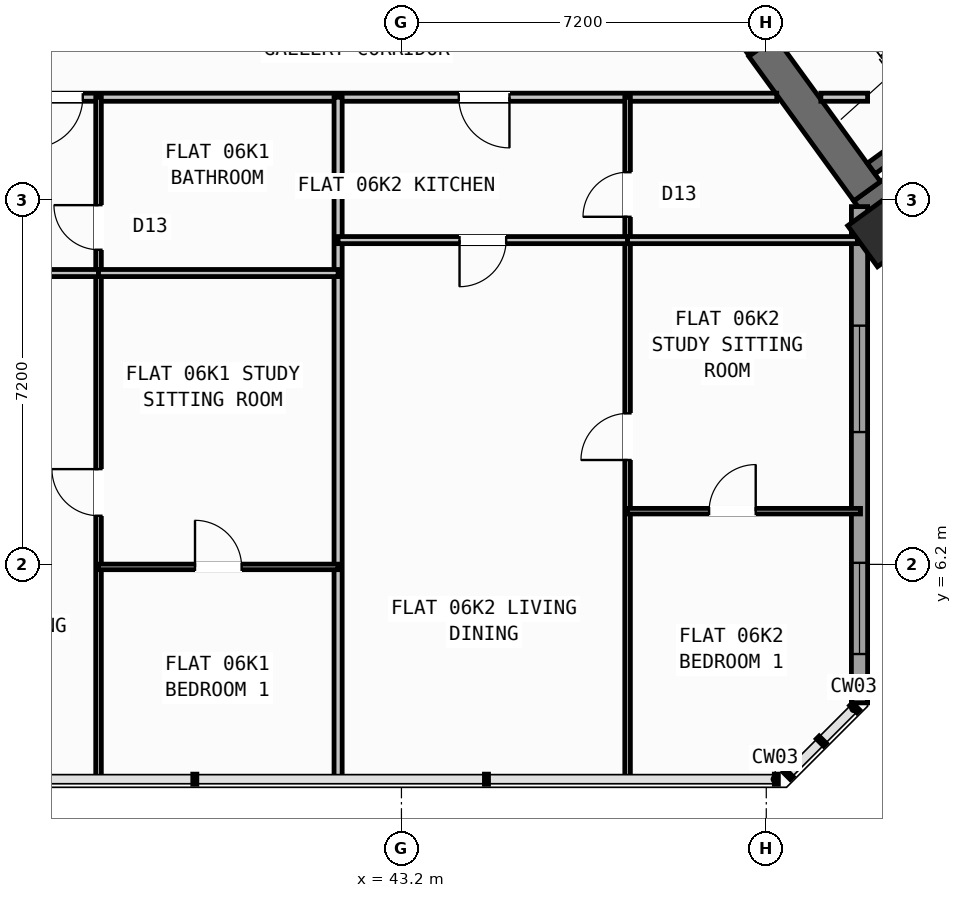
"""IFC4 building model, lengths in metres.
Left out: names, types, materials, properties, quantities, classifications, styles, units other than length and angle.
Written with IfcOpenShell. Run it as: python <this file> out.ifc"""

import sys

from ifc_helpers import new_model, si_unit, direction, frame, frame_2d, origin, origin_2d, place, context, subcontext, project, spatial, rectangle, hollow_rectangle, extrude, source, transform, mapped, element, fill, save


model = new_model("IFC4")
c1 = context("Model", 3, precision=1e-05, world=origin(), true_north=direction((0.0, 1.0)))
c2 = subcontext(c1, "Body", "Model", "MODEL_VIEW")
j1 = project(units=[si_unit("LENGTHUNIT", "METRE"), si_unit("PLANEANGLEUNIT", "RADIAN")], contexts=[c1])
p1 = place(None, origin())
s1 = spatial("IfcSite", under=j1, at=p1, CompositionType="ELEMENT")
p2 = place(p1, origin())
s2 = spatial("IfcBuilding", under=s1, at=p2, CompositionType="ELEMENT")
p3 = place(p2, frame((0.0, 0.0, 27.6)))
s3 = spatial("IfcBuildingStorey", under=s2, at=p3, CompositionType="ELEMENT", Elevation=27.6)
p4 = place(p3, frame((36.683, 18.304, 0.0), z_axis=(0.0, 0.0, 1.0), x_axis=(-0.529899109053, -0.848060690178, 0.0)))
e1 = element("IfcWall", 1, at=p4, inside=s3, PredefinedType="SHEAR", context=c2, shape_type="SweptSolid", body=[
    extrude(rectangle(XDim=6.375, YDim=0.65, at=frame_2d((3.188, 0.0))), origin(), (0.0, 0.0, 1.0), 3.35),
])
p5 = place(p3, frame((52.318, 13.11, 0.0), z_axis=(0.0, 0.0, 1.0), x_axis=(0.809019445368, 0.587781878776, 0.0)))
e2 = element("IfcWall", 2, at=p5, inside=s3, PredefinedType="SHEAR", context=c2, shape_type="SweptSolid", body=[
    extrude(rectangle(XDim=12.44, YDim=0.65, at=frame_2d((6.22, 0.0))), origin(), (0.0, 0.0, 1.0), 3.35),
])
p6 = place(p3, frame((52.39, 13.564, 0.0), z_axis=(0.0, 0.0, 1.0), x_axis=(-0.58779688989, 0.809008539037, 0.0)))
e3 = element("IfcWall", 3, at=p6, inside=s3, PredefinedType="SHEAR", context=c2, shape_type="SweptSolid", body=[
    extrude(rectangle(XDim=3.525, YDim=0.65, at=frame_2d((1.763, 0.0))), origin(), (0.0, 0.0, 1.0), 3.35),
])
m1 = source(origin(), c2, "Body", "SweptSolid", [
    extrude(hollow_rectangle(XDim=1.0, YDim=1.0, WallThickness=0.04, at=origin_2d()), origin(), (0.0, 0.0, 1.0), 3.6),
])
p7 = place(p3, frame((52.705, 12.773, 0.0), z_axis=(0.0, 0.0, 1.0), x_axis=(0.809016994375, 0.587785252292, 0.0)))
e4 = element("IfcColumn", 4, at=p7, inside=s3, PredefinedType="COLUMN", context=c2, shape_type="MappedRepresentation", body=[
    mapped(m1, transform((0.0, 0.0, 0.0), scale=1.0)),
])
p8 = place(p3, frame((56.581, 7.439, 0.0), z_axis=(0.0, 0.0, 1.0), x_axis=(-0.587785875463, 0.809016541614, 0.0)))
e5 = element("IfcWall", 5, at=p8, inside=s3, PredefinedType="STANDARD", context=c2, shape_type="SweptSolid", body=[
    extrude(rectangle(XDim=6.774, YDim=0.32, at=frame_2d((3.387, 0.0))), origin(), (0.0, 0.0, 1.0), 2.725),
])
p9 = place(p8, frame((1.556, 0.0, 0.8)))
e6 = element("IfcOpeningElement", 6, at=p9, cuts=e5, PredefinedType="OPENING", context=c2, shape_type="SweptSolid", body=[
    extrude(rectangle(XDim=2.1, YDim=1.55, at=frame_2d((1.05, 0.775))), frame((0.0, 0.17, 0.0), z_axis=(0.0, -1.0, 0.0), x_axis=(1.0, 0.0, 0.0)), (0.0, 0.0, 1.0), 0.34),
])
p10 = place(p3, frame((52.24, 13.261, 0.0), z_axis=(0.0, 0.0, 1.0), x_axis=(0.0, -1.0, 0.0)))
e7 = element("IfcWall", 7, at=p10, inside=s3, PredefinedType="STANDARD", context=c2, shape_type="SweptSolid", body=[
    extrude(rectangle(XDim=9.795, YDim=0.32, at=frame_2d((4.897, 0.0))), origin(), (0.0, 0.0, 1.0), 3.35),
])
p11 = place(p10, frame((2.349, 0.0, 0.8)))
e8 = element("IfcOpeningElement", 8, at=p11, cuts=e7, PredefinedType="OPENING", context=c2, shape_type="SweptSolid", body=[
    extrude(rectangle(XDim=2.1, YDim=1.55, at=frame_2d((1.05, 0.775))), frame((0.0, 0.17, 0.0), z_axis=(0.0, -1.0, 0.0), x_axis=(1.0, 0.0, 0.0)), (0.0, 0.0, 1.0), 0.34),
])
p12 = place(p10, frame((7.03, 0.0, 0.85)))
e9 = element("IfcOpeningElement", 9, at=p12, cuts=e7, PredefinedType="OPENING", context=c2, shape_type="SweptSolid", body=[
    extrude(rectangle(XDim=1.8, YDim=1.5, at=frame_2d((0.9, 0.75))), frame((0.0, 0.17, 0.0), z_axis=(0.0, -1.0, 0.0), x_axis=(1.0, 0.0, 0.0)), (0.0, 0.0, 1.0), 0.34),
])
p13 = place(p3, frame((52.472, 14.013, 0.0), z_axis=(0.0, 0.0, 1.0), x_axis=(0.809028366311, 0.587769599847, 0.0)))
e10 = element("IfcWall", 10, at=p13, inside=s3, PredefinedType="SHEAR", context=c2, shape_type="SweptSolid", body=[
    extrude(rectangle(XDim=7.33, YDim=0.26, at=frame_2d((3.665, 0.0))), origin(), (0.0, 0.0, 1.0), 3.35),
])
p14 = place(p3, frame((35.296, 15.42, 0.0), z_axis=(0.0, 0.0, 1.0), x_axis=(1.0, 0.0, 0.0)))
e11 = element("IfcWall", 11, at=p14, inside=s3, PredefinedType="PARTITIONING", context=c2, shape_type="SweptSolid", body=[
    extrude(rectangle(XDim=15.311, YDim=0.16, at=frame_2d((7.655, 0.0))), origin(), (0.0, 0.0, 1.0), 3.34),
])
p15 = place(p14, frame((0.615, 0.0, 0.0)))
e12 = element("IfcOpeningElement", 12, at=p15, cuts=e11, PredefinedType="OPENING", context=c2, shape_type="SweptSolid", body=[
    extrude(rectangle(XDim=1.0, YDim=2.1, at=frame_2d((0.5, 1.05))), frame((0.0, 0.09, 0.0), z_axis=(0.0, -1.0, 0.0), x_axis=(1.0, 0.0, 0.0)), (0.0, 0.0, 1.0), 0.18),
])
p16 = place(p14, frame((9.035, 0.0, 0.0)))
e13 = element("IfcOpeningElement", 13, at=p16, cuts=e11, PredefinedType="OPENING", context=c2, shape_type="SweptSolid", body=[
    extrude(rectangle(XDim=1.0, YDim=2.1, at=frame_2d((0.5, 1.05))), frame((0.0, 0.09, 0.0), z_axis=(0.0, -1.0, 0.0), x_axis=(1.0, 0.0, 0.0)), (0.0, 0.0, 1.0), 0.18),
])
p17 = place(p3, frame((51.477, 15.42, 0.0), z_axis=(0.0, 0.0, 1.0), x_axis=(1.0, 0.0, 0.0)))
e14 = element("IfcWall", 14, at=p17, inside=s3, PredefinedType="PARTITIONING", context=c2, shape_type="SweptSolid", body=[
    extrude(rectangle(XDim=0.923, YDim=0.16, at=frame_2d((0.461, 0.0))), origin(), (0.0, 0.0, 1.0), 3.34),
])
p18 = place(p3, frame((50.119, 16.333, 0.0), z_axis=(0.0, 0.0, 1.0), x_axis=(-0.587749856981, 0.809042709391, 0.0)))
e15 = element("IfcWall", 15, at=p18, inside=s3, PredefinedType="STANDARD", context=c2, shape_type="SweptSolid", body=[
    extrude(rectangle(XDim=2.96, YDim=0.2, at=frame_2d((1.48, 0.0))), origin(), (0.0, 0.0, 1.0), 3.34),
])
p19 = place(p18, frame((0.53, 0.0, 0.0)))
e16 = element("IfcOpeningElement", 16, at=p19, cuts=e15, PredefinedType="OPENING", context=c2, shape_type="SweptSolid", body=[
    extrude(rectangle(XDim=1.5, YDim=2.15, at=frame_2d((0.75, 1.075))), frame((0.0, 0.11, 0.0), z_axis=(0.0, -1.0, 0.0), x_axis=(1.0, 0.0, 0.0)), (0.0, 0.0, 1.0), 0.22),
])
p20 = place(p3, frame((41.95, 1.96, 0.0), z_axis=(0.0, 0.0, 1.0), x_axis=(0.0, 1.0, 0.0)))
e17 = element("IfcWall", 17, at=p20, inside=s3, PredefinedType="PARTITIONING", context=c2, shape_type="SweptSolid", body=[
    extrude(rectangle(XDim=13.46, YDim=0.16, at=frame_2d((6.73, 0.0))), origin(), (0.0, 0.0, 1.0), 3.34),
])
p21 = place(p3, frame((37.222, 1.96, 0.0), z_axis=(0.0, 0.0, 1.0), x_axis=(0.0, 1.0, 0.0)))
e18 = element("IfcWall", 18, at=p21, inside=s3, PredefinedType="PARTITIONING", context=c2, shape_type="SweptSolid", body=[
    extrude(rectangle(XDim=13.46, YDim=0.11, at=frame_2d((6.73, 0.0))), origin(), (0.0, 0.0, 1.0), 3.34),
])
p22 = place(p21, frame((5.2, 0.0, 0.0)))
e19 = element("IfcOpeningElement", 19, at=p22, cuts=e18, PredefinedType="OPENING", context=c2, shape_type="SweptSolid", body=[
    extrude(rectangle(XDim=0.92, YDim=2.08, at=frame_2d((0.46, 1.04))), frame((0.0, 0.065, 0.0), z_axis=(0.0, -1.0, 0.0), x_axis=(1.0, 0.0, 0.0)), (0.0, 0.0, 1.0), 0.13),
])
p23 = place(p21, frame((10.45, 0.0, 0.0)))
e20 = element("IfcOpeningElement", 20, at=p23, cuts=e18, PredefinedType="OPENING", context=c2, shape_type="SweptSolid", body=[
    extrude(rectangle(XDim=0.88, YDim=2.08, at=frame_2d((0.44, 1.04))), frame((0.0, 0.065, 0.0), z_axis=(0.0, -1.0, 0.0), x_axis=(1.0, 0.0, 0.0)), (0.0, 0.0, 1.0), 0.13),
])
p24 = place(p3, frame((33.564, 11.95, 0.0), z_axis=(0.0, 0.0, 1.0), x_axis=(1.0, 0.0, 0.0)))
e21 = element("IfcWall", 21, at=p24, inside=s3, PredefinedType="PLUMBINGWALL", context=c2, shape_type="SweptSolid", body=[
    extrude(rectangle(XDim=3.657, YDim=0.14, at=frame_2d((1.829, 0.0))), origin(), (0.0, 0.0, 1.0), 2.525),
])
p25 = place(p24, frame((0.637, 0.0, 0.0)))
e22 = element("IfcOpeningElement", 22, at=p25, cuts=e21, PredefinedType="OPENING", context=c2, shape_type="SweptSolid", body=[
    extrude(rectangle(XDim=0.92, YDim=2.08, at=frame_2d((0.46, 1.04))), frame((0.0, 0.08, 0.0), z_axis=(0.0, -1.0, 0.0), x_axis=(1.0, 0.0, 0.0)), (0.0, 0.0, 1.0), 0.16),
])
p26 = place(p3, frame((37.222, 11.95, 0.0), z_axis=(0.0, 0.0, 1.0), x_axis=(1.0, 0.0, 0.0)))
e23 = element("IfcWall", 23, at=p26, inside=s3, PredefinedType="PLUMBINGWALL", context=c2, shape_type="SweptSolid", body=[
    extrude(rectangle(XDim=4.728, YDim=0.14, at=frame_2d((2.364, 0.0))), origin(), (0.0, 0.0, 1.0), 2.525),
])
p27 = place(p3, frame((37.222, 6.15, 0.0), z_axis=(0.0, 0.0, 1.0), x_axis=(1.0, 0.0, 0.0)))
e24 = element("IfcWall", 24, at=p27, inside=s3, PredefinedType="PARTITIONING", context=c2, shape_type="SweptSolid", body=[
    extrude(rectangle(XDim=4.728, YDim=0.11, at=frame_2d((2.364, 0.0))), origin(), (0.0, 0.0, 1.0), 3.34),
])
p28 = place(p27, frame((1.904, 0.0, 0.0)))
e25 = element("IfcOpeningElement", 25, at=p28, cuts=e24, PredefinedType="OPENING", context=c2, shape_type="SweptSolid", body=[
    extrude(rectangle(XDim=0.92, YDim=2.08, at=frame_2d((0.46, 1.04))), frame((0.0, 0.065, 0.0), z_axis=(0.0, -1.0, 0.0), x_axis=(1.0, 0.0, 0.0)), (0.0, 0.0, 1.0), 0.13),
])
p29 = place(p3, frame((47.663, 1.96, 0.0), z_axis=(0.0, 0.0, 1.0), x_axis=(0.0, 1.0, 0.0)))
e26 = element("IfcWall", 26, at=p29, inside=s3, PredefinedType="PARTITIONING", context=c2, shape_type="SweptSolid", body=[
    extrude(rectangle(XDim=13.46, YDim=0.11, at=frame_2d((6.73, 0.0))), origin(), (0.0, 0.0, 1.0), 3.34),
])
p30 = place(p29, frame((6.3, 0.0, 0.0)))
e27 = element("IfcOpeningElement", 27, at=p30, cuts=e26, PredefinedType="OPENING", context=c2, shape_type="SweptSolid", body=[
    extrude(rectangle(XDim=0.92, YDim=2.08, at=frame_2d((0.46, 1.04))), frame((0.0, 0.065, 0.0), z_axis=(0.0, -1.0, 0.0), x_axis=(1.0, 0.0, 0.0)), (0.0, 0.0, 1.0), 0.13),
])
p31 = place(p29, frame((11.1, 0.0, 0.0)))
e28 = element("IfcOpeningElement", 28, at=p31, cuts=e26, PredefinedType="OPENING", context=c2, shape_type="SweptSolid", body=[
    extrude(rectangle(XDim=0.88, YDim=2.08, at=frame_2d((0.44, 1.04))), frame((0.0, 0.065, 0.0), z_axis=(0.0, -1.0, 0.0), x_axis=(1.0, 0.0, 0.0)), (0.0, 0.0, 1.0), 0.13),
])
p32 = place(p3, frame((41.95, 12.6, 0.0), z_axis=(0.0, 0.0, 1.0), x_axis=(1.0, 0.0, 0.0)))
e29 = element("IfcWall", 29, at=p32, inside=s3, PredefinedType="PLUMBINGWALL", context=c2, shape_type="SweptSolid", body=[
    extrude(rectangle(XDim=5.713, YDim=0.14, at=frame_2d((2.856, 0.0))), origin(), (0.0, 0.0, 1.0), 2.525),
])
p33 = place(p32, frame((2.396, 0.0, 0.0)))
e30 = element("IfcOpeningElement", 30, at=p33, cuts=e29, PredefinedType="OPENING", context=c2, shape_type="SweptSolid", body=[
    extrude(rectangle(XDim=0.92, YDim=2.08, at=frame_2d((0.46, 1.04))), frame((0.0, 0.08, 0.0), z_axis=(0.0, -1.0, 0.0), x_axis=(1.0, 0.0, 0.0)), (0.0, 0.0, 1.0), 0.16),
])
p34 = place(p3, frame((47.663, 12.6, 0.0), z_axis=(0.0, 0.0, 1.0), x_axis=(1.0, 0.0, 0.0)))
e31 = element("IfcWall", 31, at=p34, inside=s3, PredefinedType="PLUMBINGWALL", context=c2, shape_type="SweptSolid", body=[
    extrude(rectangle(XDim=4.535, YDim=0.14, at=frame_2d((2.268, 0.0))), origin(), (0.0, 0.0, 1.0), 2.525),
])
p35 = place(p3, frame((47.663, 7.25, 0.0), z_axis=(0.0, 0.0, 1.0), x_axis=(1.0, 0.0, 0.0)))
e32 = element("IfcWall", 32, at=p35, inside=s3, PredefinedType="PARTITIONING", context=c2, shape_type="SweptSolid", body=[
    extrude(rectangle(XDim=4.597, YDim=0.11, at=frame_2d((2.298, 0.0))), origin(), (0.0, 0.0, 1.0), 3.34),
])
p36 = place(p35, frame((1.608, 0.0, 0.0)))
e33 = element("IfcOpeningElement", 33, at=p36, cuts=e32, PredefinedType="OPENING", context=c2, shape_type="SweptSolid", body=[
    extrude(rectangle(XDim=0.92, YDim=2.08, at=frame_2d((0.46, 1.04))), frame((0.0, 0.065, 0.0), z_axis=(0.0, -1.0, 0.0), x_axis=(1.0, 0.0, 0.0)), (0.0, 0.0, 1.0), 0.13),
])
m2 = source(origin(), c2, "Body", "SweptSolid", [
    extrude(rectangle(XDim=2.1, YDim=1.55, at=frame_2d((1.05, 0.775))), frame((0.0, 0.03, 0.0), z_axis=(0.0, -1.0, 0.0), x_axis=(1.0, 0.0, 0.0)), (0.0, 0.0, 1.0), 0.06),
])
p37 = place(p11, origin())
e34 = element("IfcWindow", 34, at=p37, inside=s3, PartitioningType="SINGLE_PANEL", PredefinedType="WINDOW", context=c2, shape_type="MappedRepresentation", body=[
    mapped(m2, transform((0.0, 0.0, 0.0), scale=1.0)),
])
fill(e8, e34)
m3 = source(origin(), c2, "Body", "SweptSolid", [
    extrude(rectangle(XDim=1.8, YDim=1.5, at=frame_2d((0.9, 0.75))), frame((0.0, 0.03, 0.0), z_axis=(0.0, -1.0, 0.0), x_axis=(1.0, 0.0, 0.0)), (0.0, 0.0, 1.0), 0.06),
])
p38 = place(p12, origin())
e35 = element("IfcWindow", 35, at=p38, inside=s3, PartitioningType="SINGLE_PANEL", PredefinedType="WINDOW", context=c2, shape_type="MappedRepresentation", body=[
    mapped(m3, transform((0.0, 0.0, 0.0), scale=1.0)),
])
fill(e9, e35)
m4 = source(origin(), c2, "Body", "SweptSolid", [
    extrude(rectangle(XDim=0.92, YDim=2.08, at=frame_2d((0.46, 1.04))), frame((0.0, 0.025, 0.0), z_axis=(0.0, -1.0, 0.0), x_axis=(1.0, 0.0, 0.0)), (0.0, 0.0, 1.0), 0.05),
])
p39 = place(p22, origin())
e36 = element("IfcDoor", 36, at=p39, inside=s3, OperationType="SINGLE_SWING_RIGHT", PredefinedType="DOOR", context=c2, shape_type="MappedRepresentation", body=[
    mapped(m4, transform((0.0, 0.0, 0.0), scale=1.0)),
])
fill(e19, e36)
p40 = place(p28, origin())
e37 = element("IfcDoor", 37, at=p40, inside=s3, OperationType="SINGLE_SWING_LEFT", PredefinedType="DOOR", context=c2, shape_type="MappedRepresentation", body=[
    mapped(m4, transform((0.0, 0.0, 0.0), scale=1.0)),
])
fill(e25, e37)
m5 = source(origin(), c2, "Body", "SweptSolid", [
    extrude(rectangle(XDim=1.0, YDim=2.1, at=frame_2d((0.5, 1.05))), frame((0.0, 0.025, 0.0), z_axis=(0.0, -1.0, 0.0), x_axis=(1.0, 0.0, 0.0)), (0.0, 0.0, 1.0), 0.05),
])
p41 = place(p15, frame((1.0, 0.0, 0.0), z_axis=(0.0, 0.0, 1.0), x_axis=(-1.0, 0.0, 0.0)))
e38 = element("IfcDoor", 38, at=p41, inside=s3, OperationType="SINGLE_SWING_RIGHT", PredefinedType="DOOR", context=c2, shape_type="MappedRepresentation", body=[
    mapped(m5, transform((0.0, 0.0, 0.0), scale=1.0)),
])
fill(e12, e38)
m6 = source(origin(), c2, "Body", "SweptSolid", [
    extrude(rectangle(XDim=0.88, YDim=2.08, at=frame_2d((0.44, 1.04))), frame((0.0, 0.025, 0.0), z_axis=(0.0, -1.0, 0.0), x_axis=(1.0, 0.0, 0.0)), (0.0, 0.0, 1.0), 0.05),
])
p42 = place(p23, origin())
e39 = element("IfcDoor", 39, at=p42, inside=s3, OperationType="SINGLE_SWING_RIGHT", PredefinedType="DOOR", context=c2, shape_type="MappedRepresentation", body=[
    mapped(m6, transform((0.0, 0.0, 0.0), scale=1.0)),
])
fill(e20, e39)
p43 = place(p30, origin())
e40 = element("IfcDoor", 40, at=p43, inside=s3, OperationType="SINGLE_SWING_LEFT", PredefinedType="DOOR", context=c2, shape_type="MappedRepresentation", body=[
    mapped(m4, transform((0.0, 0.0, 0.0), scale=1.0)),
])
fill(e27, e40)
p44 = place(p36, origin())
e41 = element("IfcDoor", 41, at=p44, inside=s3, OperationType="SINGLE_SWING_RIGHT", PredefinedType="DOOR", context=c2, shape_type="MappedRepresentation", body=[
    mapped(m4, transform((0.0, 0.0, 0.0), scale=1.0)),
])
fill(e33, e41)
p45 = place(p16, frame((1.0, 0.0, 0.0), z_axis=(0.0, 0.0, 1.0), x_axis=(-1.0, 0.0, 0.0)))
e42 = element("IfcDoor", 42, at=p45, inside=s3, OperationType="SINGLE_SWING_LEFT", PredefinedType="DOOR", context=c2, shape_type="MappedRepresentation", body=[
    mapped(m5, transform((0.0, 0.0, 0.0), scale=1.0)),
])
fill(e13, e42)
p46 = place(p33, frame((0.92, 0.0, 0.0), z_axis=(0.0, 0.0, 1.0), x_axis=(-1.0, 0.0, 0.0)))
e43 = element("IfcDoor", 43, at=p46, inside=s3, OperationType="SINGLE_SWING_RIGHT", PredefinedType="DOOR", context=c2, shape_type="MappedRepresentation", body=[
    mapped(m4, transform((0.0, 0.0, 0.0), scale=1.0)),
])
fill(e30, e43)
p47 = place(p31, origin())
e44 = element("IfcDoor", 44, at=p47, inside=s3, OperationType="SINGLE_SWING_LEFT", PredefinedType="DOOR", context=c2, shape_type="MappedRepresentation", body=[
    mapped(m6, transform((0.0, 0.0, 0.0), scale=1.0)),
])
fill(e28, e44)
save(model, sys.argv[1])
